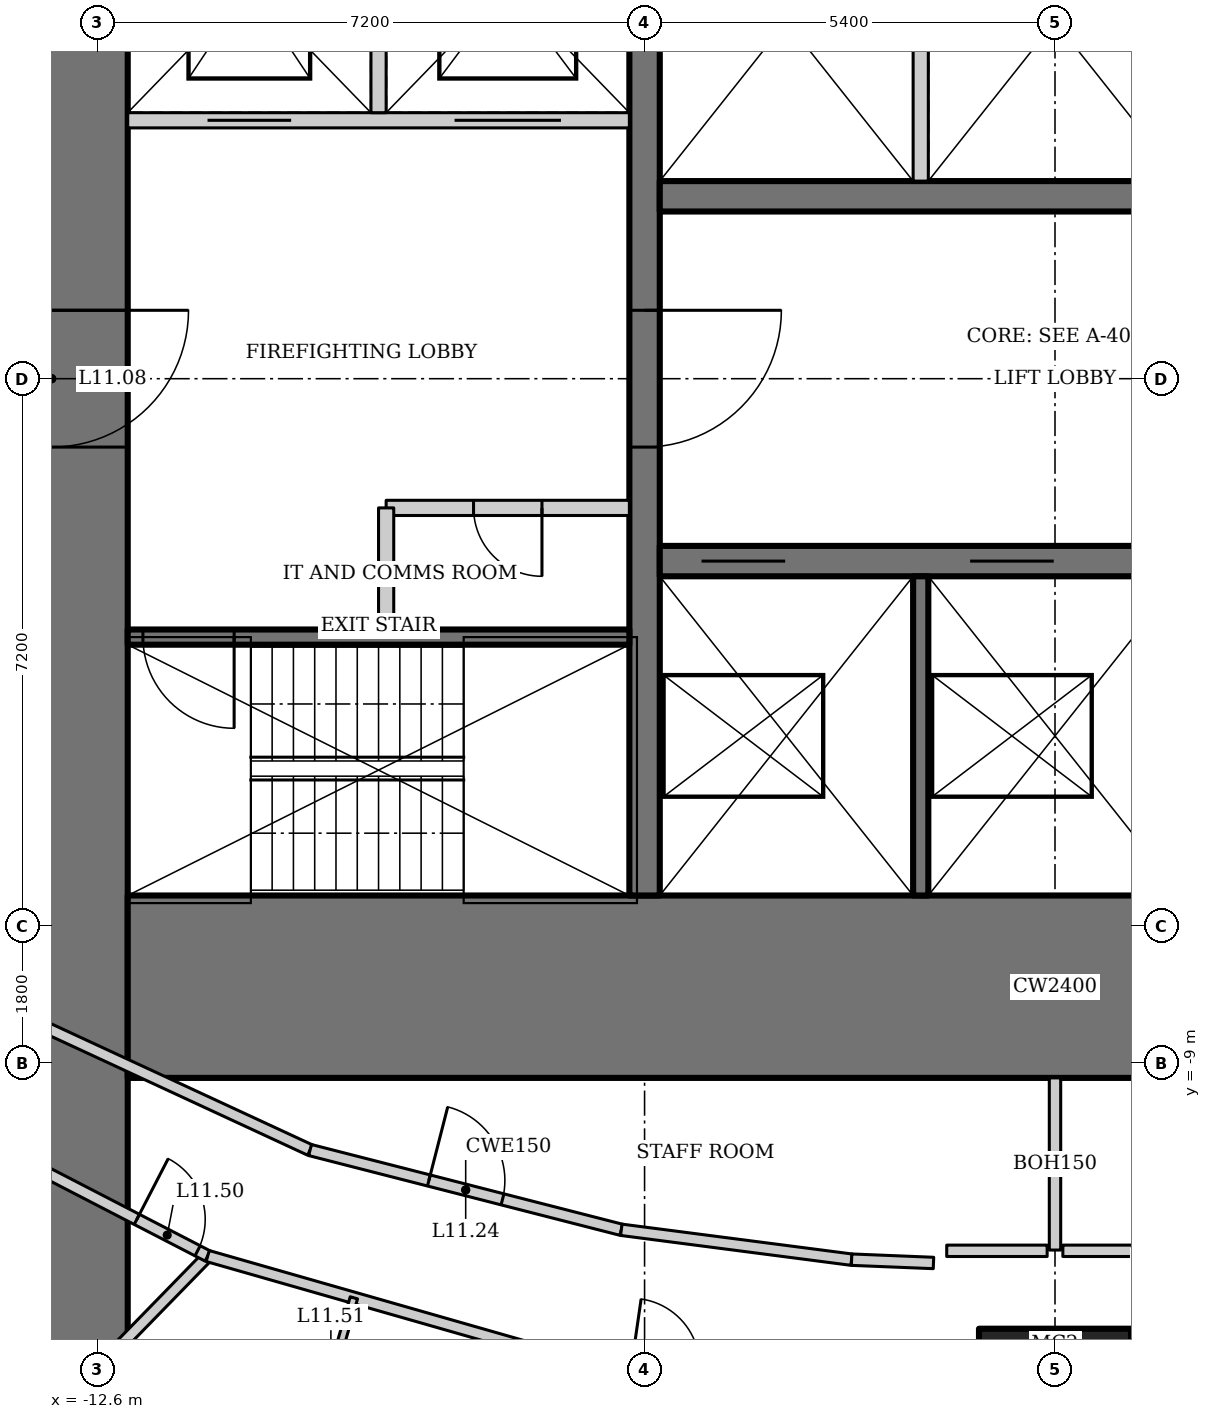
"""IFC4 building model, lengths in metres.
Left out: names, types, materials, properties, quantities, classifications, styles, units other than length and angle.
Written with IfcOpenShell. Run it as: python <this file> out.ifc"""

import sys

from ifc_helpers import new_model, si_unit, direction, frame, frame_2d, origin, origin_2d, place, context, subcontext, project, spatial, rectangle, hollow_rectangle, extrude, element, fill, save


model = new_model("IFC4")
c1 = context("Model", 3, precision=1e-05, world=origin(), true_north=direction((0.0, 1.0)))
c2 = subcontext(c1, "Body", "Model", "MODEL_VIEW")
j1 = project(units=[si_unit("LENGTHUNIT", "METRE"), si_unit("PLANEANGLEUNIT", "RADIAN")], contexts=[c1])
p1 = place(None, origin())
s1 = spatial("IfcSite", under=j1, at=p1, CompositionType="ELEMENT")
p2 = place(p1, origin())
s2 = spatial("IfcBuilding", under=s1, at=p2, CompositionType="ELEMENT")
p3 = place(p2, frame((0.0, 0.0, 55.0)))
s3 = spatial("IfcBuildingStorey", under=s2, at=p3, CompositionType="ELEMENT", Elevation=55.0)
p4 = place(p3, frame((0.0, -13.5, 0.0), z_axis=(0.0, 0.0, 1.0), x_axis=(1.0, 0.0, 0.0)))
e1 = element("IfcColumn", 1, at=p4, inside=s3, PredefinedType="COLUMN", context=c2, shape_type="SweptSolid", body=[
    extrude(hollow_rectangle(XDim=2.0, YDim=2.0, WallThickness=0.17, at=origin_2d()), origin(), (0.0, 0.0, 1.0), 3.6),
])
p5 = place(p3, frame((-13.2, 13.0, 0.0), z_axis=(0.0, 0.0, 1.0), x_axis=(0.0, -1.0, 0.0)))
e2 = element("IfcWall", 2, at=p5, inside=s3, PredefinedType="SHEAR", context=c2, shape_type="SweptSolid", body=[
    extrude(rectangle(XDim=26.0, YDim=2.0, at=frame_2d((13.0, 0.0))), origin(), (0.0, 0.0, 1.0), 3.6),
])
p6 = place(p5, frame((12.1, 0.0, 0.0)))
e3 = element("IfcOpeningElement", 3, at=p6, cuts=e2, PredefinedType="OPENING", context=c2, shape_type="SweptSolid", body=[
    extrude(rectangle(XDim=1.8, YDim=2.1, at=frame_2d((0.9, 1.05))), frame((0.0, 1.01, 0.0), z_axis=(0.0, -1.0, 0.0), x_axis=(1.0, 0.0, 0.0)), (0.0, 0.0, 1.0), 2.02),
])
p7 = place(p3, frame((-12.2, -8.0, 0.0), z_axis=(0.0, 0.0, 1.0), x_axis=(1.0, 0.0, 0.0)))
e4 = element("IfcWall", 4, at=p7, inside=s3, PredefinedType="SHEAR", context=c2, shape_type="SweptSolid", body=[
    extrude(rectangle(XDim=24.4, YDim=2.4, at=frame_2d((12.2, 0.0))), origin(), (0.0, 0.0, 1.0), 3.6),
])
p8 = place(p3, frame((-5.4, 6.8, 0.0), z_axis=(0.0, 0.0, 1.0), x_axis=(0.0, -1.0, 0.0)))
e5 = element("IfcWall", 5, at=p8, inside=s3, PredefinedType="SHEAR", context=c2, shape_type="SweptSolid", body=[
    extrude(rectangle(XDim=13.6, YDim=0.4, at=frame_2d((6.8, 0.0))), origin(), (0.0, 0.0, 1.0), 3.6),
])
p9 = place(p8, frame((5.9, 0.0, 0.0)))
e6 = element("IfcOpeningElement", 6, at=p9, cuts=e5, PredefinedType="OPENING", context=c2, shape_type="SweptSolid", body=[
    extrude(rectangle(XDim=1.8, YDim=2.1, at=frame_2d((0.9, 1.05))), frame((0.0, 0.21, 0.0), z_axis=(0.0, -1.0, 0.0), x_axis=(1.0, 0.0, 0.0)), (0.0, 0.0, 1.0), 0.42),
])
p10 = place(p3, frame((-5.2, -2.4, 0.0), z_axis=(0.0, 0.0, 1.0), x_axis=(1.0, 0.0, 0.0)))
e7 = element("IfcWall", 7, at=p10, inside=s3, PredefinedType="SHEAR", context=c2, shape_type="SweptSolid", body=[
    extrude(rectangle(XDim=10.4, YDim=0.4, at=frame_2d((5.2, 0.0))), origin(), (0.0, 0.0, 1.0), 3.6),
])
p11 = place(p10, frame((0.55, 0.0, 0.0)))
e8 = element("IfcOpeningElement", 8, at=p11, cuts=e7, PredefinedType="OPENING", context=c2, shape_type="SweptSolid", body=[
    extrude(rectangle(XDim=1.1, YDim=2.2, at=frame_2d((0.55, 1.1))), frame((0.0, 0.21, 0.0), z_axis=(0.0, -1.0, 0.0), x_axis=(1.0, 0.0, 0.0)), (0.0, 0.0, 1.0), 0.42),
])
p12 = place(p10, frame((4.083, 0.0, 0.0)))
e9 = element("IfcOpeningElement", 9, at=p12, cuts=e7, PredefinedType="OPENING", context=c2, shape_type="SweptSolid", body=[
    extrude(rectangle(XDim=1.1, YDim=2.2, at=frame_2d((0.55, 1.1))), frame((0.0, 0.21, 0.0), z_axis=(0.0, -1.0, 0.0), x_axis=(1.0, 0.0, 0.0)), (0.0, 0.0, 1.0), 0.42),
])
p13 = place(p10, frame((7.617, 0.0, 0.0)))
e10 = element("IfcOpeningElement", 10, at=p13, cuts=e7, PredefinedType="OPENING", context=c2, shape_type="SweptSolid", body=[
    extrude(rectangle(XDim=1.1, YDim=2.2, at=frame_2d((0.55, 1.1))), frame((0.0, 0.21, 0.0), z_axis=(0.0, -1.0, 0.0), x_axis=(1.0, 0.0, 0.0)), (0.0, 0.0, 1.0), 0.42),
])
p14 = place(p3, frame((-1.767, -2.6, 0.0), z_axis=(0.0, 0.0, 1.0), x_axis=(0.0, -1.0, 0.0)))
e11 = element("IfcWall", 11, at=p14, inside=s3, PredefinedType="SOLIDWALL", context=c2, shape_type="SweptSolid", body=[
    extrude(rectangle(XDim=4.2, YDim=0.2, at=frame_2d((2.1, 0.0))), origin(), (0.0, 0.0, 1.0), 3.6),
])
p15 = place(p3, frame((5.2, 2.4, 0.0), z_axis=(0.0, 0.0, 1.0), x_axis=(-1.0, 0.0, 0.0)))
e12 = element("IfcWall", 12, at=p15, inside=s3, PredefinedType="SHEAR", context=c2, shape_type="SweptSolid", body=[
    extrude(rectangle(XDim=10.4, YDim=0.4, at=frame_2d((5.2, 0.0))), origin(), (0.0, 0.0, 1.0), 3.6),
])
p16 = place(p3, frame((-1.767, 2.6, 0.0), z_axis=(0.0, 0.0, 1.0), x_axis=(0.0, 1.0, 0.0)))
e13 = element("IfcWall", 13, at=p16, inside=s3, PredefinedType="SOLIDWALL", context=c2, shape_type="SweptSolid", body=[
    extrude(rectangle(XDim=4.2, YDim=0.2, at=frame_2d((2.1, 0.0))), origin(), (0.0, 0.0, 1.0), 3.6),
])
p17 = place(p3, frame((-5.6, -3.4, 0.0), z_axis=(0.0, 0.0, 1.0), x_axis=(-1.0, 0.0, 0.0)))
e14 = element("IfcWall", 14, at=p17, inside=s3, PredefinedType="SHEAR", context=c2, shape_type="SweptSolid", body=[
    extrude(rectangle(XDim=6.6, YDim=0.2, at=frame_2d((3.3, 0.0))), origin(), (0.0, 0.0, 1.0), 3.6),
])
p18 = place(p17, frame((5.2, 0.0, 0.0)))
e15 = element("IfcOpeningElement", 15, at=p18, cuts=e14, PredefinedType="OPENING", context=c2, shape_type="SweptSolid", body=[
    extrude(rectangle(XDim=1.2, YDim=2.1, at=frame_2d((0.6, 1.05))), frame((0.0, 0.11, 0.0), z_axis=(0.0, -1.0, 0.0), x_axis=(1.0, 0.0, 0.0)), (0.0, 0.0, 1.0), 0.22),
])
p19 = place(p3, frame((-12.2, 3.4, 0.0), z_axis=(0.0, 0.0, 1.0), x_axis=(1.0, 0.0, 0.0)))
e16 = element("IfcWall", 16, at=p19, inside=s3, PredefinedType="SOLIDWALL", context=c2, shape_type="SweptSolid", body=[
    extrude(rectangle(XDim=6.6, YDim=0.2, at=frame_2d((3.3, 0.0))), origin(), (0.0, 0.0, 1.0), 3.6),
])
p20 = place(p19, frame((1.05, 0.0, 0.0)))
e17 = element("IfcOpeningElement", 17, at=p20, cuts=e16, PredefinedType="OPENING", context=c2, shape_type="SweptSolid", body=[
    extrude(rectangle(XDim=1.1, YDim=2.2, at=frame_2d((0.55, 1.1))), frame((0.0, 0.11, 0.0), z_axis=(0.0, -1.0, 0.0), x_axis=(1.0, 0.0, 0.0)), (0.0, 0.0, 1.0), 0.22),
])
p21 = place(p19, frame((4.3, 0.0, 0.0)))
e18 = element("IfcOpeningElement", 18, at=p21, cuts=e16, PredefinedType="OPENING", context=c2, shape_type="SweptSolid", body=[
    extrude(rectangle(XDim=1.4, YDim=2.2, at=frame_2d((0.7, 1.1))), frame((0.0, 0.11, 0.0), z_axis=(0.0, -1.0, 0.0), x_axis=(1.0, 0.0, 0.0)), (0.0, 0.0, 1.0), 0.22),
])
p22 = place(p3, frame((-8.9, 3.5, 0.0), z_axis=(0.0, 0.0, 1.0), x_axis=(0.0, 1.0, 0.0)))
e19 = element("IfcWall", 19, at=p22, inside=s3, PredefinedType="SOLIDWALL", context=c2, shape_type="SweptSolid", body=[
    extrude(rectangle(XDim=3.3, YDim=0.2, at=frame_2d((1.65, 0.0))), origin(), (0.0, 0.0, 1.0), 3.6),
])
p23 = place(p3, frame((-5.6, -1.7, 0.0), z_axis=(0.0, 0.0, 1.0), x_axis=(-1.0, 0.0, 0.0)))
e20 = element("IfcWall", 20, at=p23, inside=s3, PredefinedType="SOLIDWALL", context=c2, shape_type="SweptSolid", body=[
    extrude(rectangle(XDim=3.2, YDim=0.2, at=frame_2d((1.6, 0.0))), origin(), (0.0, 0.0, 1.0), 3.45),
])
p24 = place(p23, frame((1.15, 0.0, 0.0)))
e21 = element("IfcOpeningElement", 21, at=p24, cuts=e20, PredefinedType="OPENING", context=c2, shape_type="SweptSolid", body=[
    extrude(rectangle(XDim=0.9, YDim=2.1, at=frame_2d((0.45, 1.05))), frame((0.0, 0.11, 0.0), z_axis=(0.0, -1.0, 0.0), x_axis=(1.0, 0.0, 0.0)), (0.0, 0.0, 1.0), 0.22),
])
p25 = place(p3, frame((-8.8, -1.7, 0.0), z_axis=(0.0, 0.0, 1.0), x_axis=(0.0, -1.0, 0.0)))
e22 = element("IfcWall", 22, at=p25, inside=s3, PredefinedType="SOLIDWALL", context=c2, shape_type="SweptSolid", body=[
    extrude(rectangle(XDim=1.6, YDim=0.2, at=frame_2d((0.8, 0.0))), origin(), (0.0, 0.0, 1.0), 3.45),
])
p26 = place(p3, frame((-17.97, -18.542, 0.0), z_axis=(0.0, 0.0, 1.0), x_axis=(0.698095013805, 0.71600513385, 0.0)))
e23 = element("IfcWall", 23, at=p26, inside=s3, PredefinedType="PARTITIONING", context=c2, shape_type="SweptSolid", body=[
    extrude(rectangle(XDim=9.774, YDim=0.15, at=frame_2d((4.887, 0.0))), origin(), (0.0, 0.0, 1.0), 2.528),
])
p27 = place(p3, frame((-15.901, -9.086, 0.0), z_axis=(0.0, 0.0, 1.0), x_axis=(0.888333171507, -0.459199495209, 0.0)))
e24 = element("IfcWall", 24, at=p27, inside=s3, PredefinedType="PARTITIONING", context=c2, shape_type="SweptSolid", body=[
    extrude(rectangle(XDim=5.351, YDim=0.15, at=frame_2d((2.676, 0.0))), origin(), (0.0, 0.0, 1.0), 3.45),
])
p28 = place(p27, frame((4.301, 0.0, 0.0)))
e25 = element("IfcOpeningElement", 25, at=p28, cuts=e24, PredefinedType="OPENING", context=c2, shape_type="SweptSolid", body=[
    extrude(rectangle(XDim=0.9, YDim=2.1, at=frame_2d((0.45, 1.05))), frame((0.0, 0.085, 0.0), z_axis=(0.0, -1.0, 0.0), x_axis=(1.0, 0.0, 0.0)), (0.0, 0.0, 1.0), 0.17),
])
p29 = place(p3, frame((-11.147, -11.544, 0.0), z_axis=(0.0, 0.0, 1.0), x_axis=(0.961464178199, -0.27493023486, 0.0)))
e26 = element("IfcWall", 26, at=p29, inside=s3, PredefinedType="PARTITIONING", context=c2, shape_type="SweptSolid", body=[
    extrude(rectangle(XDim=4.78, YDim=0.15, at=frame_2d((2.39, 0.0))), origin(), (0.0, 0.0, 1.0), 3.45),
])
p30 = place(p3, frame((-14.196, -8.112, 0.0), z_axis=(0.0, 0.0, 1.0), x_axis=(0.907279653965, -0.420527798727, 0.0)))
e27 = element("IfcWall", 27, at=p30, inside=s3, PredefinedType="PARTITIONING", context=c2, shape_type="SweptSolid", body=[
    extrude(rectangle(XDim=4.844, YDim=0.15, at=frame_2d((2.422, 0.0))), origin(), (0.0, 0.0, 1.0), 3.45),
])
p31 = place(p3, frame((-9.801, -10.149, 0.0), z_axis=(0.0, 0.0, 1.0), x_axis=(0.968705891355, -0.248211393886, 0.0)))
e28 = element("IfcWall", 28, at=p31, inside=s3, PredefinedType="PARTITIONING", context=c2, shape_type="SweptSolid", body=[
    extrude(rectangle(XDim=4.228, YDim=0.15, at=frame_2d((2.114, 0.0))), origin(), (0.0, 0.0, 1.0), 3.45),
])
p32 = place(p31, frame((1.614, 0.0, 0.0)))
e29 = element("IfcOpeningElement", 29, at=p32, cuts=e28, PredefinedType="OPENING", context=c2, shape_type="SweptSolid", body=[
    extrude(rectangle(XDim=1.0, YDim=2.1, at=frame_2d((0.5, 1.05))), frame((0.0, 0.085, 0.0), z_axis=(0.0, -1.0, 0.0), x_axis=(1.0, 0.0, 0.0)), (0.0, 0.0, 1.0), 0.17),
])
p33 = place(p3, frame((-5.706, -11.198, 0.0), z_axis=(0.0, 0.0, 1.0), x_axis=(0.99168929531, -0.128655903743, 0.0)))
e30 = element("IfcWall", 30, at=p33, inside=s3, PredefinedType="PARTITIONING", context=c2, shape_type="SweptSolid", body=[
    extrude(rectangle(XDim=3.055, YDim=0.15, at=frame_2d((1.528, 0.0))), origin(), (0.0, 0.0, 1.0), 3.45),
])
p34 = place(p3, frame((-9.225, -12.094, 0.0), z_axis=(0.0, 0.0, 1.0), x_axis=(-0.274949510627, -0.961458666093, 0.0)))
e31 = element("IfcWall", 31, at=p34, inside=s3, PredefinedType="PARTITIONING", context=c2, shape_type="SweptSolid", body=[
    extrude(rectangle(XDim=2.4, YDim=0.1, at=frame_2d((1.2, 0.0))), origin(), (0.0, 0.0, 1.0), 3.45),
])
p35 = place(p34, frame((0.7, 0.0, 0.0)))
e32 = element("IfcOpeningElement", 32, at=p35, cuts=e31, PredefinedType="OPENING", context=c2, shape_type="SweptSolid", body=[
    extrude(rectangle(XDim=0.8, YDim=2.1, at=frame_2d((0.4, 1.05))), frame((0.0, 0.06, 0.0), z_axis=(0.0, -1.0, 0.0), x_axis=(1.0, 0.0, 0.0)), (0.0, 0.0, 1.0), 0.12),
])
p36 = place(p3, frame((-2.676, -11.592, 0.0), z_axis=(0.0, 0.0, 1.0), x_axis=(0.999178004727, -0.040537820228, 0.0)))
e33 = element("IfcWall", 33, at=p36, inside=s3, PredefinedType="PARTITIONING", context=c2, shape_type="SweptSolid", body=[
    extrude(rectangle(XDim=1.078, YDim=0.15, at=frame_2d((0.539, 0.0))), origin(), (0.0, 0.0, 1.0), 3.45),
])
p37 = place(p3, frame((0.0, -9.2, 0.0), z_axis=(0.0, 0.0, 1.0), x_axis=(0.0, -1.0, 0.0)))
e34 = element("IfcWall", 34, at=p37, inside=s3, PredefinedType="PARTITIONING", context=c2, shape_type="SweptSolid", body=[
    extrude(rectangle(XDim=2.265, YDim=0.15, at=frame_2d((1.133, 0.0))), origin(), (0.0, 0.0, 1.0), 3.044),
])
for number, where, z_axis, x_axis in (
    (35, (-1.425, -11.475, 0.0), (0.0, 0.0, 1.0), (1.0, 0.0, 0.0)),
    (36, (0.103, -11.475, 0.0), (0.0, 0.0, 1.0), (1.0, 0.0, 0.0)),
):
    element("IfcWall", number, at=place(p3, frame(where, z_axis=z_axis, x_axis=x_axis)), inside=s3, PredefinedType="PARTITIONING", context=c2, shape_type="SweptSolid", body=[
        extrude(rectangle(XDim=1.321, YDim=0.15, at=frame_2d((0.661, 0.0))), origin(), (0.0, 0.0, 1.0), 3.45),
    ])
p38 = place(p24, origin())
e37 = element("IfcDoor", 37, at=p38, inside=s3, OperationType="SINGLE_SWING_LEFT", PredefinedType="DOOR", context=c2, shape_type="SweptSolid", body=[
    extrude(rectangle(XDim=0.9, YDim=2.1, at=frame_2d((0.45, 1.05))), frame((0.0, 0.025, 0.0), z_axis=(0.0, -1.0, 0.0), x_axis=(1.0, 0.0, 0.0)), (0.0, 0.0, 1.0), 0.05),
])
fill(e21, e37)
p39 = place(p9, origin())
e38 = element("IfcDoor", 38, at=p39, inside=s3, OperationType="DOUBLE_DOOR_DOUBLE_SWING", PredefinedType="DOOR", context=c2, shape_type="SweptSolid", body=[
    extrude(rectangle(XDim=1.8, YDim=2.1, at=frame_2d((0.9, 1.05))), frame((0.0, 0.025, 0.0), z_axis=(0.0, -1.0, 0.0), x_axis=(1.0, 0.0, 0.0)), (0.0, 0.0, 1.0), 0.05),
])
fill(e6, e38)
p40 = place(p18, origin())
e39 = element("IfcDoor", 39, at=p40, inside=s3, OperationType="SINGLE_SWING_RIGHT", PredefinedType="DOOR", context=c2, shape_type="SweptSolid", body=[
    extrude(rectangle(XDim=1.2, YDim=2.1, at=frame_2d((0.6, 1.05))), frame((0.0, 0.025, 0.0), z_axis=(0.0, -1.0, 0.0), x_axis=(1.0, 0.0, 0.0)), (0.0, 0.0, 1.0), 0.05),
])
fill(e15, e39)
p41 = place(p6, origin())
e40 = element("IfcDoor", 40, at=p41, inside=s3, OperationType="DOUBLE_DOOR_DOUBLE_SWING", PredefinedType="DOOR", context=c2, shape_type="SweptSolid", body=[
    extrude(rectangle(XDim=1.8, YDim=2.1, at=frame_2d((0.9, 1.05))), frame((0.0, 0.025, 0.0), z_axis=(0.0, -1.0, 0.0), x_axis=(1.0, 0.0, 0.0)), (0.0, 0.0, 1.0), 0.05),
])
fill(e3, e40)
p42 = place(p11, origin())
e41 = element("IfcDoor", 41, at=p42, inside=s3, OperationType="DOUBLE_DOOR_SLIDING", PredefinedType="DOOR", context=c2, shape_type="SweptSolid", body=[
    extrude(rectangle(XDim=1.1, YDim=2.2, at=frame_2d((0.55, 1.1))), frame((0.0, 0.025, 0.0), z_axis=(0.0, -1.0, 0.0), x_axis=(1.0, 0.0, 0.0)), (0.0, 0.0, 1.0), 0.05),
])
fill(e8, e41)
p43 = place(p12, origin())
e42 = element("IfcDoor", 42, at=p43, inside=s3, OperationType="DOUBLE_DOOR_SLIDING", PredefinedType="DOOR", context=c2, shape_type="SweptSolid", body=[
    extrude(rectangle(XDim=1.1, YDim=2.2, at=frame_2d((0.55, 1.1))), frame((0.0, 0.025, 0.0), z_axis=(0.0, -1.0, 0.0), x_axis=(1.0, 0.0, 0.0)), (0.0, 0.0, 1.0), 0.05),
])
fill(e9, e42)
p44 = place(p20, origin())
e43 = element("IfcDoor", 43, at=p44, inside=s3, OperationType="DOUBLE_DOOR_SLIDING", PredefinedType="DOOR", context=c2, shape_type="SweptSolid", body=[
    extrude(rectangle(XDim=1.1, YDim=2.2, at=frame_2d((0.55, 1.1))), frame((0.0, 0.025, 0.0), z_axis=(0.0, -1.0, 0.0), x_axis=(1.0, 0.0, 0.0)), (0.0, 0.0, 1.0), 0.05),
])
fill(e17, e43)
p45 = place(p21, origin())
e44 = element("IfcDoor", 44, at=p45, inside=s3, OperationType="DOUBLE_DOOR_SLIDING", PredefinedType="DOOR", context=c2, shape_type="SweptSolid", body=[
    extrude(rectangle(XDim=1.4, YDim=2.2, at=frame_2d((0.7, 1.1))), frame((0.0, 0.025, 0.0), z_axis=(0.0, -1.0, 0.0), x_axis=(1.0, 0.0, 0.0)), (0.0, 0.0, 1.0), 0.05),
])
fill(e18, e44)
p46 = place(p32, origin())
e45 = element("IfcDoor", 45, at=p46, inside=s3, OperationType="SINGLE_SWING_LEFT", PredefinedType="DOOR", context=c2, shape_type="SweptSolid", body=[
    extrude(rectangle(XDim=1.0, YDim=2.1, at=frame_2d((0.5, 1.05))), frame((0.0, 0.025, 0.0), z_axis=(0.0, -1.0, 0.0), x_axis=(1.0, 0.0, 0.0)), (0.0, 0.0, 1.0), 0.05),
])
fill(e29, e45)
p47 = place(p28, origin())
e46 = element("IfcDoor", 46, at=p47, inside=s3, OperationType="SINGLE_SWING_LEFT", PredefinedType="DOOR", context=c2, shape_type="SweptSolid", body=[
    extrude(rectangle(XDim=0.9, YDim=2.1, at=frame_2d((0.45, 1.05))), frame((0.0, 0.025, 0.0), z_axis=(0.0, -1.0, 0.0), x_axis=(1.0, 0.0, 0.0)), (0.0, 0.0, 1.0), 0.05),
])
fill(e25, e46)
save(model, sys.argv[1])
